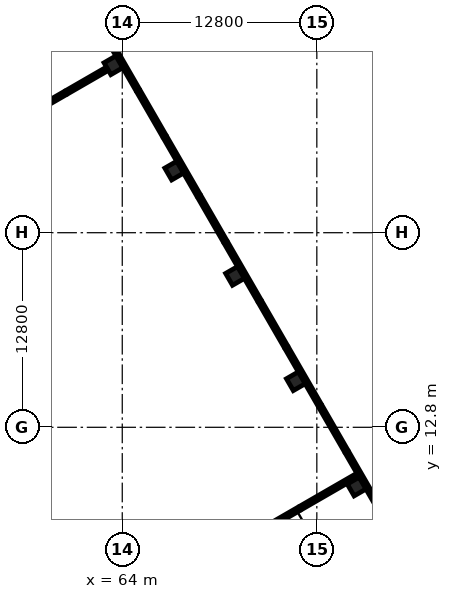
"""IFC4 building model, lengths in metres.
Left out: names, types, materials, properties, quantities, classifications, styles, units other than length and angle.
Written with IfcOpenShell. Run it as: python <this file> out.ifc"""

import sys

from ifc_helpers import new_model, si_unit, direction, frame, frame_2d, origin, origin_2d, place, context, subcontext, project, spatial, rectangle, extrude, element, fill, save


model = new_model("IFC4")
c1 = context("Model", 3, precision=1e-05, world=origin(), true_north=direction((0.0, 1.0)))
c2 = subcontext(c1, "Body", "Model", "MODEL_VIEW")
j1 = project(units=[si_unit("LENGTHUNIT", "METRE"), si_unit("PLANEANGLEUNIT", "RADIAN")], contexts=[c1])
p1 = place(None, origin())
s1 = spatial("IfcSite", under=j1, at=p1, CompositionType="ELEMENT")
p2 = place(p1, origin())
s2 = spatial("IfcBuilding", under=s1, at=p2, CompositionType="ELEMENT")
p3 = place(p2, frame((0.0, 0.0, 6.0)))
s3 = spatial("IfcBuildingStorey", under=s2, at=p3, CompositionType="ELEMENT", Elevation=6.0)
for number, where, z_axis, x_axis in (
    (1, (79.417, 8.901, 0.0), (0.0, 0.0, 1.0), (-0.5, 0.866, 0.0)),
    (2, (75.417, 15.829, 0.0), (0.0, 0.0, 1.0), (-0.5, 0.866, 0.0)),
    (3, (71.417, 22.758, 0.0), (0.0, 0.0, 1.0), (-0.5, 0.866, 0.0)),
    (4, (67.417, 29.686, 0.0), (0.0, 0.0, 1.0), (-0.5, 0.866, 0.0)),
    (5, (63.417, 36.614, 0.0), (0.0, 0.0, 1.0), (-0.5, 0.866, 0.0)),
):
    element("IfcColumn", number, at=place(p3, frame(where, z_axis=z_axis, x_axis=x_axis)), inside=s3, PredefinedType="COLUMN", context=c2, shape_type="SweptSolid", body=[
        extrude(rectangle(XDim=0.9, YDim=0.9, at=origin_2d()), origin(), (0.0, 0.0, 1.0), 5.4),
    ])
p4 = place(p3, frame((78.759, 11.191, 0.0), z_axis=(0.0, 0.0, 1.0), x_axis=(0.500001855621, -0.866024332438, 0.0)))
e6 = element("IfcWall", 6, at=p4, inside=s3, PredefinedType="SOLIDWALL", context=c2, shape_type="SweptSolid", body=[
    extrude(rectangle(XDim=10.312, YDim=0.25, at=frame_2d((5.156, 0.0))), origin(), (0.0, 0.0, 1.0), 5.1),
])
p5 = place(p3, frame((77.009, 14.222, 0.0), z_axis=(0.0, 0.0, 1.0), x_axis=(0.500010275428, -0.866019471182, 0.0)))
e7 = element("IfcWall", 7, at=p5, inside=s3, PredefinedType="SOLIDWALL", context=c2, shape_type="SweptSolid", body=[
    extrude(rectangle(XDim=3.5, YDim=0.25, at=frame_2d((1.75, 0.0))), origin(), (0.0, 0.0, 1.0), 5.1),
])
p6 = place(p5, frame((0.25, 0.0, 1.0)))
e8 = element("IfcOpeningElement", 8, at=p6, cuts=e7, PredefinedType="OPENING", context=c2, shape_type="SweptSolid", body=[
    extrude(rectangle(XDim=3.0, YDim=2.8, at=frame_2d((1.5, 1.4))), frame((0.0, 0.135, 0.0), z_axis=(0.0, -1.0, 0.0), x_axis=(1.0, 0.0, 0.0)), (0.0, 0.0, 1.0), 0.27),
])
p7 = place(p3, frame((74.79, 18.065, 0.0), z_axis=(0.0, 0.0, 1.0), x_axis=(0.499990705068, -0.866030770149, 0.0)))
e9 = element("IfcWall", 9, at=p7, inside=s3, PredefinedType="SOLIDWALL", context=c2, shape_type="SweptSolid", body=[
    extrude(rectangle(XDim=4.438, YDim=0.25, at=frame_2d((2.219, 0.0))), origin(), (0.0, 0.0, 1.0), 5.1),
])
p8 = place(p3, frame((73.04, 21.097, 0.0), z_axis=(0.0, 0.0, 1.0), x_axis=(0.499980071345, -0.866036909293, 0.0)))
e10 = element("IfcWall", 10, at=p8, inside=s3, PredefinedType="SOLIDWALL", context=c2, shape_type="SweptSolid", body=[
    extrude(rectangle(XDim=3.5, YDim=0.25, at=frame_2d((1.75, 0.0))), origin(), (0.0, 0.0, 1.0), 5.1),
])
p9 = place(p8, frame((0.25, 0.0, 1.0)))
e11 = element("IfcOpeningElement", 11, at=p9, cuts=e10, PredefinedType="OPENING", context=c2, shape_type="SweptSolid", body=[
    extrude(rectangle(XDim=3.0, YDim=2.8, at=frame_2d((1.5, 1.4))), frame((0.0, 0.135, 0.0), z_axis=(0.0, -1.0, 0.0), x_axis=(1.0, 0.0, 0.0)), (0.0, 0.0, 1.0), 0.27),
])
p10 = place(p3, frame((70.79, 24.994, 0.0), z_axis=(0.0, 0.0, 1.0), x_axis=(0.500013631625, -0.866017533419, 0.0)))
e12 = element("IfcWall", 12, at=p10, inside=s3, PredefinedType="SOLIDWALL", context=c2, shape_type="SweptSolid", body=[
    extrude(rectangle(XDim=4.5, YDim=0.25, at=frame_2d((2.25, 0.0))), origin(), (0.0, 0.0, 1.0), 5.1),
])
p11 = place(p3, frame((69.04, 28.025, 0.0), z_axis=(0.0, 0.0, 1.0), x_axis=(0.499980071345, -0.866036909293, 0.0)))
e13 = element("IfcWall", 13, at=p11, inside=s3, PredefinedType="SOLIDWALL", context=c2, shape_type="SweptSolid", body=[
    extrude(rectangle(XDim=3.5, YDim=0.25, at=frame_2d((1.75, 0.0))), origin(), (0.0, 0.0, 1.0), 5.1),
])
p12 = place(p11, frame((0.25, 0.0, 1.0)))
e14 = element("IfcOpeningElement", 14, at=p12, cuts=e13, PredefinedType="OPENING", context=c2, shape_type="SweptSolid", body=[
    extrude(rectangle(XDim=3.0, YDim=2.8, at=frame_2d((1.5, 1.4))), frame((0.0, 0.135, 0.0), z_axis=(0.0, -1.0, 0.0), x_axis=(1.0, 0.0, 0.0)), (0.0, 0.0, 1.0), 0.27),
])
p13 = place(p3, frame((66.79, 31.922, 0.0), z_axis=(0.0, 0.0, 1.0), x_axis=(0.500013631625, -0.866017533419, 0.0)))
e15 = element("IfcWall", 15, at=p13, inside=s3, PredefinedType="SOLIDWALL", context=c2, shape_type="SweptSolid", body=[
    extrude(rectangle(XDim=4.5, YDim=0.25, at=frame_2d((2.25, 0.0))), origin(), (0.0, 0.0, 1.0), 5.1),
])
p14 = place(p3, frame((65.04, 34.953, 0.0), z_axis=(0.0, 0.0, 1.0), x_axis=(0.500010275428, -0.866019471182, 0.0)))
e16 = element("IfcWall", 16, at=p14, inside=s3, PredefinedType="SOLIDWALL", context=c2, shape_type="SweptSolid", body=[
    extrude(rectangle(XDim=3.5, YDim=0.25, at=frame_2d((1.75, 0.0))), origin(), (0.0, 0.0, 1.0), 5.1),
])
p15 = place(p14, frame((0.25, 0.0, 1.0)))
e17 = element("IfcOpeningElement", 17, at=p15, cuts=e16, PredefinedType="OPENING", context=c2, shape_type="SweptSolid", body=[
    extrude(rectangle(XDim=3.0, YDim=2.8, at=frame_2d((1.5, 1.4))), frame((0.0, 0.135, 0.0), z_axis=(0.0, -1.0, 0.0), x_axis=(1.0, 0.0, 0.0)), (0.0, 0.0, 1.0), 0.27),
])
p16 = place(p3, frame((63.172, 38.189, 0.0), z_axis=(0.0, 0.0, 1.0), x_axis=(0.499982597115, -0.866035451112, 0.0)))
e18 = element("IfcWall", 18, at=p16, inside=s3, PredefinedType="SOLIDWALL", context=c2, shape_type="SweptSolid", body=[
    extrude(rectangle(XDim=3.737, YDim=0.25, at=frame_2d((1.869, 0.0))), origin(), (0.0, 0.0, 1.0), 5.1),
])
p17 = place(p3, frame((75.684, 7.468, 0.0), z_axis=(0.0, 0.0, 1.0), x_axis=(-0.866019956843, -0.50000943426, 0.0)))
e19 = element("IfcWall", 19, at=p17, inside=s3, PredefinedType="SOLIDWALL", context=c2, shape_type="SweptSolid", body=[
    extrude(rectangle(XDim=2.7, YDim=0.25, at=frame_2d((1.35, 0.0))), origin(), (0.0, 0.0, 1.0), 4.5),
])
p18 = place(p17, frame((0.25, 0.0, 0.0)))
e20 = element("IfcOpeningElement", 20, at=p18, cuts=e19, PredefinedType="OPENING", context=c2, shape_type="SweptSolid", body=[
    extrude(rectangle(XDim=2.2, YDim=2.1, at=frame_2d((1.1, 1.05))), frame((0.0, 0.135, 0.0), z_axis=(0.0, -1.0, 0.0), x_axis=(1.0, 0.0, 0.0)), (0.0, 0.0, 1.0), 0.27),
])
p19 = place(p3, frame((75.684, 7.468, 0.0), z_axis=(0.0, 0.0, 1.0), x_axis=(0.866018331238, 0.50001224981, 0.0)))
e21 = element("IfcWall", 21, at=p19, inside=s3, PredefinedType="SOLIDWALL", context=c2, shape_type="SweptSolid", body=[
    extrude(rectangle(XDim=4.4, YDim=0.25, at=frame_2d((2.2, 0.0))), origin(), (0.0, 0.0, 1.0), 4.5),
])
p20 = place(p3, frame((26.178, 15.114, 0.0), z_axis=(0.0, 0.0, 1.0), x_axis=(0.866025540551, 0.499999763114, 0.0)))
e22 = element("IfcWall", 22, at=p20, inside=s3, PredefinedType="SOLIDWALL", context=c2, shape_type="SweptSolid", body=[
    extrude(rectangle(XDim=39.4, YDim=0.25, at=frame_2d((19.7, 0.0))), origin(), (0.0, 0.0, 1.0), 10.2),
])
p21 = place(p3, frame((60.3, 34.814, 0.0), z_axis=(0.0, 0.0, 1.0), x_axis=(0.866035871367, 0.499981869177, 0.0)))
e23 = element("IfcWall", 23, at=p21, inside=s3, PredefinedType="SOLIDWALL", context=c2, shape_type="SweptSolid", body=[
    extrude(rectangle(XDim=3.15, YDim=0.25, at=frame_2d((1.575, 0.0))), origin(), (0.0, 0.0, 1.0), 4.5),
])
p22 = place(p6, origin())
e24 = element("IfcWindow", 24, at=p22, inside=s3, PartitioningType="SINGLE_PANEL", PredefinedType="WINDOW", context=c2, shape_type="SweptSolid", body=[
    extrude(rectangle(XDim=3.0, YDim=2.8, at=frame_2d((1.5, 1.4))), frame((0.0, 0.03, 0.0), z_axis=(0.0, -1.0, 0.0), x_axis=(1.0, 0.0, 0.0)), (0.0, 0.0, 1.0), 0.06),
])
fill(e8, e24)
p23 = place(p9, origin())
e25 = element("IfcWindow", 25, at=p23, inside=s3, PartitioningType="SINGLE_PANEL", PredefinedType="WINDOW", context=c2, shape_type="SweptSolid", body=[
    extrude(rectangle(XDim=3.0, YDim=2.8, at=frame_2d((1.5, 1.4))), frame((0.0, 0.03, 0.0), z_axis=(0.0, -1.0, 0.0), x_axis=(1.0, 0.0, 0.0)), (0.0, 0.0, 1.0), 0.06),
])
fill(e11, e25)
p24 = place(p12, origin())
e26 = element("IfcWindow", 26, at=p24, inside=s3, PartitioningType="SINGLE_PANEL", PredefinedType="WINDOW", context=c2, shape_type="SweptSolid", body=[
    extrude(rectangle(XDim=3.0, YDim=2.8, at=frame_2d((1.5, 1.4))), frame((0.0, 0.03, 0.0), z_axis=(0.0, -1.0, 0.0), x_axis=(1.0, 0.0, 0.0)), (0.0, 0.0, 1.0), 0.06),
])
fill(e14, e26)
p25 = place(p15, origin())
e27 = element("IfcWindow", 27, at=p25, inside=s3, PartitioningType="SINGLE_PANEL", PredefinedType="WINDOW", context=c2, shape_type="SweptSolid", body=[
    extrude(rectangle(XDim=3.0, YDim=2.8, at=frame_2d((1.5, 1.4))), frame((0.0, 0.03, 0.0), z_axis=(0.0, -1.0, 0.0), x_axis=(1.0, 0.0, 0.0)), (0.0, 0.0, 1.0), 0.06),
])
fill(e17, e27)
p26 = place(p18, origin())
e28 = element("IfcDoor", 28, at=p26, inside=s3, OperationType="DOUBLE_DOOR_SINGLE_SWING", PredefinedType="DOOR", context=c2, shape_type="SweptSolid", body=[
    extrude(rectangle(XDim=2.2, YDim=2.1, at=frame_2d((1.1, 1.05))), frame((0.0, 0.025, 0.0), z_axis=(0.0, -1.0, 0.0), x_axis=(1.0, 0.0, 0.0)), (0.0, 0.0, 1.0), 0.05),
])
fill(e20, e28)
save(model, sys.argv[1])
